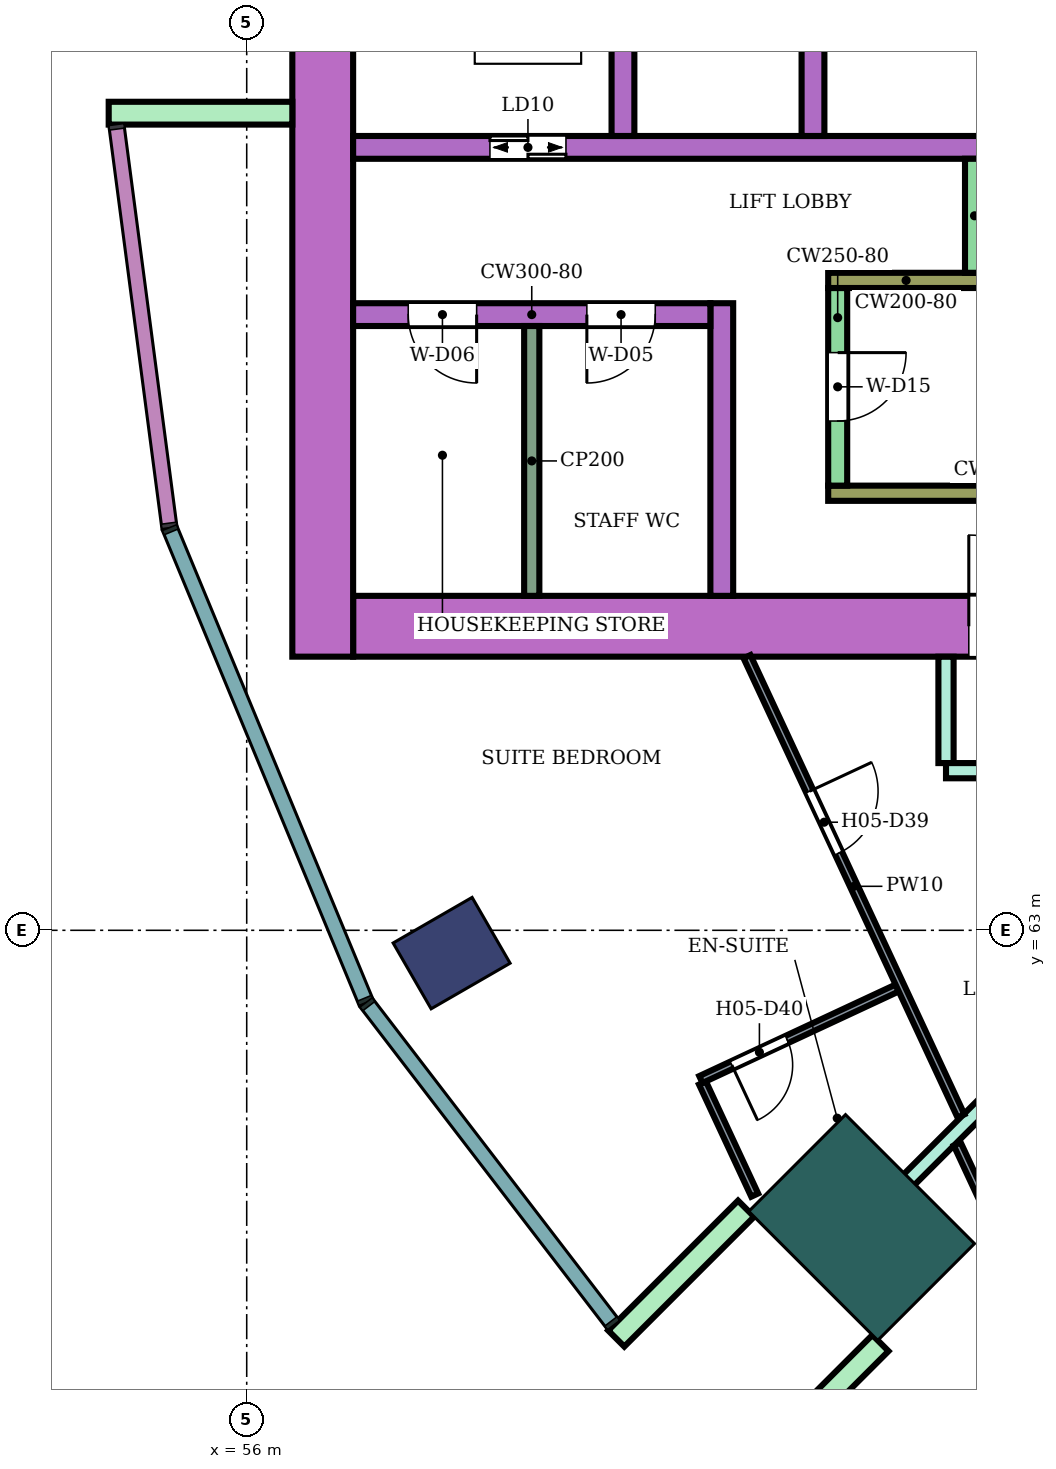
"""IFC4 building model, lengths in metres.
Left out: names, types, materials, properties, quantities, classifications, styles, units other than length and angle.
Written with IfcOpenShell. Run it as: python <this file> out.ifc"""

import sys

from ifc_helpers import new_model, si_unit, direction, frame, frame_2d, origin, origin_2d, place, context, subcontext, project, spatial, rectangle, extrude, element, fill, save


model = new_model("IFC4")
c1 = context("Model", 3, precision=1e-05, world=origin(), true_north=direction((0.0, 1.0)))
c2 = subcontext(c1, "Body", "Model", "MODEL_VIEW")
j1 = project(units=[si_unit("LENGTHUNIT", "METRE"), si_unit("PLANEANGLEUNIT", "RADIAN")], contexts=[c1])
p1 = place(None, origin())
s1 = spatial("IfcSite", under=j1, at=p1, CompositionType="ELEMENT")
p2 = place(p1, origin())
s2 = spatial("IfcBuilding", under=s1, at=p2, CompositionType="ELEMENT")
p3 = place(p2, frame((0.0, 0.0, 90.0)))
s3 = spatial("IfcBuildingStorey", under=s2, at=p3, CompositionType="ELEMENT", Elevation=90.0)
p4 = place(p3, frame((58.696, 62.7, 0.0), z_axis=(0.0, 0.0, 1.0), x_axis=(-0.866025403784, -0.5, 0.0)))
e1 = element("IfcColumn", 1, at=p4, inside=s3, PredefinedType="COLUMN", context=c2, shape_type="SweptSolid", body=[
    extrude(rectangle(XDim=1.2, YDim=1.0, at=origin_2d()), origin(), (0.0, 0.0, 1.0), 3.8),
])
p5 = place(p3, frame((64.09, 59.09, 0.0), z_axis=(0.0, 0.0, 1.0), x_axis=(-0.707106781187, -0.707106781187, 0.0)))
e2 = element("IfcColumn", 2, at=p5, inside=s3, PredefinedType="COLUMN", context=c2, shape_type="SweptSolid", body=[
    extrude(rectangle(XDim=1.8, YDim=2.4, at=origin_2d()), origin(), (0.0, 0.0, 1.0), 3.8),
])
p6 = place(p3, frame((72.1, 67.0, 0.0), z_axis=(0.0, 0.0, 1.0), x_axis=(-1.0, 0.0, 0.0)))
e3 = element("IfcWall", 3, at=p6, inside=s3, PredefinedType="SHEAR", context=c2, shape_type="SweptSolid", body=[
    extrude(rectangle(XDim=14.7, YDim=0.8, at=frame_2d((7.35, 0.0))), origin(), (0.0, 0.0, 1.0), 3.48),
])
p7 = place(p6, frame((4.2, 0.0, 0.0)))
e4 = element("IfcOpeningElement", 4, at=p7, cuts=e3, PredefinedType="OPENING", context=c2, shape_type="SweptSolid", body=[
    extrude(rectangle(XDim=2.4, YDim=2.4, at=frame_2d((1.2, 1.2))), frame((0.0, 0.41, 0.0), z_axis=(0.0, -1.0, 0.0), x_axis=(1.0, 0.0, 0.0)), (0.0, 0.0, 1.0), 0.82),
])
p8 = place(p3, frame((57.0, 83.4, 0.0), z_axis=(0.0, 0.0, 1.0), x_axis=(0.0, -1.0, 0.0)))
e5 = element("IfcWall", 5, at=p8, inside=s3, PredefinedType="SHEAR", context=c2, shape_type="SweptSolid", body=[
    extrude(rectangle(XDim=16.8, YDim=0.8, at=frame_2d((8.4, 0.0))), origin(), (0.0, 0.0, 1.0), 3.48),
])
p9 = place(p3, frame((68.3, 73.3, 0.0), z_axis=(0.0, 0.0, 1.0), x_axis=(-1.0, 0.0, 0.0)))
e6 = element("IfcWall", 6, at=p9, inside=s3, PredefinedType="SHEAR", context=c2, shape_type="SweptSolid", body=[
    extrude(rectangle(XDim=10.9, YDim=0.3, at=frame_2d((5.45, 0.0))), origin(), (0.0, 0.0, 1.0), 3.48),
])
p10 = place(p9, frame((0.55, 0.0, 0.0)))
e7 = element("IfcOpeningElement", 7, at=p10, cuts=e6, PredefinedType="OPENING", context=c2, shape_type="SweptSolid", body=[
    extrude(rectangle(XDim=1.1, YDim=2.1, at=frame_2d((0.55, 1.05))), frame((0.0, 0.16, 0.0), z_axis=(0.0, -1.0, 0.0), x_axis=(1.0, 0.0, 0.0)), (0.0, 0.0, 1.0), 0.32),
])
p11 = place(p9, frame((8.1, 0.0, 0.0)))
e8 = element("IfcOpeningElement", 8, at=p11, cuts=e6, PredefinedType="OPENING", context=c2, shape_type="SweptSolid", body=[
    extrude(rectangle(XDim=1.0, YDim=2.1, at=frame_2d((0.5, 1.05))), frame((0.0, 0.16, 0.0), z_axis=(0.0, -1.0, 0.0), x_axis=(1.0, 0.0, 0.0)), (0.0, 0.0, 1.0), 0.32),
])
for number, where, z_axis, x_axis in (
    (9, (63.45, 76.0, 0.0), (0.0, 0.0, 1.0), (0.0, -1.0, 0.0)),
    (10, (60.95, 76.0, 0.0), (0.0, 0.0, 1.0), (0.0, -1.0, 0.0)),
):
    element("IfcWall", number, at=place(p3, frame(where, z_axis=z_axis, x_axis=x_axis)), inside=s3, PredefinedType="SHEAR", context=c2, shape_type="SweptSolid", body=[
        extrude(rectangle(XDim=2.55, YDim=0.3, at=frame_2d((1.275, 0.0))), origin(), (0.0, 0.0, 1.0), 3.48),
    ])
p12 = place(p3, frame((68.3, 68.75, 0.0), z_axis=(0.0, 0.0, 1.0), x_axis=(-1.0, 0.0, 0.0)))
e11 = element("IfcWall", 11, at=p12, inside=s3, PredefinedType="SHEAR", context=c2, shape_type="SweptSolid", body=[
    extrude(rectangle(XDim=4.65, YDim=0.2, at=frame_2d((2.325, 0.0))), origin(), (0.0, 0.0, 1.0), 3.48),
])
p13 = place(p3, frame((63.775, 71.45, 0.0), z_axis=(0.0, 0.0, 1.0), x_axis=(0.0, -1.0, 0.0)))
e12 = element("IfcWall", 12, at=p13, inside=s3, PredefinedType="SHEAR", context=c2, shape_type="SweptSolid", body=[
    extrude(rectangle(XDim=2.6, YDim=0.25, at=frame_2d((1.3, 0.0))), origin(), (0.0, 0.0, 1.0), 3.48),
])
p14 = place(p13, frame((0.85, 0.0, 0.0)))
e13 = element("IfcOpeningElement", 13, at=p14, cuts=e12, PredefinedType="OPENING", context=c2, shape_type="SweptSolid", body=[
    extrude(rectangle(XDim=0.9, YDim=2.1, at=frame_2d((0.45, 1.05))), frame((0.0, 0.135, 0.0), z_axis=(0.0, -1.0, 0.0), x_axis=(1.0, 0.0, 0.0)), (0.0, 0.0, 1.0), 0.27),
])
p15 = place(p3, frame((65.7, 71.55, 0.0), z_axis=(0.0, 0.0, 1.0), x_axis=(-1.0, 0.0, 0.0)))
e14 = element("IfcWall", 14, at=p15, inside=s3, PredefinedType="SHEAR", context=c2, shape_type="SweptSolid", body=[
    extrude(rectangle(XDim=2.05, YDim=0.2, at=frame_2d((1.025, 0.0))), origin(), (0.0, 0.0, 1.0), 3.48),
])
p16 = place(p3, frame((65.575, 73.15, 0.0), z_axis=(0.0, 0.0, 1.0), x_axis=(0.0, -1.0, 0.0)))
e15 = element("IfcWall", 15, at=p16, inside=s3, PredefinedType="SHEAR", context=c2, shape_type="SweptSolid", body=[
    extrude(rectangle(XDim=1.5, YDim=0.25, at=frame_2d((0.75, 0.0))), origin(), (0.0, 0.0, 1.0), 3.48),
])
p17 = place(p3, frame((62.25, 71.25, 0.0), z_axis=(0.0, 0.0, 1.0), x_axis=(0.0, -1.0, 0.0)))
e16 = element("IfcWall", 16, at=p17, inside=s3, PredefinedType="SHEAR", context=c2, shape_type="SweptSolid", body=[
    extrude(rectangle(XDim=3.85, YDim=0.3, at=frame_2d((1.925, 0.0))), origin(), (0.0, 0.0, 1.0), 3.48),
])
p18 = place(p3, frame((62.1, 71.1, 0.0), z_axis=(0.0, 0.0, 1.0), x_axis=(-1.0, 0.0, 0.0)))
e17 = element("IfcWall", 17, at=p18, inside=s3, PredefinedType="SHEAR", context=c2, shape_type="SweptSolid", body=[
    extrude(rectangle(XDim=4.7, YDim=0.3, at=frame_2d((2.35, 0.0))), origin(), (0.0, 0.0, 1.0), 3.48),
])
p19 = place(p18, frame((0.725, 0.0, 0.0)))
e18 = element("IfcOpeningElement", 18, at=p19, cuts=e17, PredefinedType="OPENING", context=c2, shape_type="SweptSolid", body=[
    extrude(rectangle(XDim=0.9, YDim=2.1, at=frame_2d((0.45, 1.05))), frame((0.0, 0.16, 0.0), z_axis=(0.0, -1.0, 0.0), x_axis=(1.0, 0.0, 0.0)), (0.0, 0.0, 1.0), 0.32),
])
p20 = place(p18, frame((3.075, 0.0, 0.0)))
e19 = element("IfcOpeningElement", 19, at=p20, cuts=e17, PredefinedType="OPENING", context=c2, shape_type="SweptSolid", body=[
    extrude(rectangle(XDim=0.9, YDim=2.1, at=frame_2d((0.45, 1.05))), frame((0.0, 0.16, 0.0), z_axis=(0.0, -1.0, 0.0), x_axis=(1.0, 0.0, 0.0)), (0.0, 0.0, 1.0), 0.32),
])
for number, where, z_axis, x_axis in (
    (20, (56.6, 73.75, 0.0), (0.0, 0.0, 1.0), (-1.0, 0.0, 0.0)),
    (21, (62.57, 59.338, 0.0), (0.0, 0.0, 1.0), (-0.707, -0.707, 0.0)),
    (22, (64.338, 57.57, 0.0), (0.0, 0.0, 1.0), (-0.707, -0.707, 0.0)),
):
    element("IfcWall", number, at=place(p3, frame(where, z_axis=z_axis, x_axis=x_axis)), inside=s3, PredefinedType="NOTDEFINED", context=c2, shape_type="SweptSolid", body=[
        extrude(rectangle(XDim=2.416, YDim=0.3, at=frame_2d((1.208, 0.0))), origin(), (0.0, 0.0, 1.0), 3.8),
    ])
p21 = place(p3, frame((63.593, 58.599, 0.0), z_axis=(0.0, 0.0, 1.0), x_axis=(0.707292874152, 0.706920639233, 0.0)))
e23 = element("IfcWall", 23, at=p21, inside=s3, PredefinedType="PARTITIONING", context=c2, shape_type="SweptSolid", body=[
    extrude(rectangle(XDim=5.247, YDim=0.2, at=frame_2d((2.624, 0.0))), origin(), (0.0, 0.0, 1.0), 3.35),
])
p22 = place(p3, frame((65.2, 65.2, 0.0), z_axis=(0.0, 0.0, 1.0), x_axis=(0.0, 1.0, 0.0)))
e24 = element("IfcWall", 24, at=p22, inside=s3, PredefinedType="PARTITIONING", context=c2, shape_type="SweptSolid", body=[
    extrude(rectangle(XDim=1.399, YDim=0.2, at=frame_2d((0.7, 0.0))), origin(), (0.0, 0.0, 1.0), 3.35),
])
p23 = place(p3, frame((65.2, 65.1, 0.0), z_axis=(0.0, 0.0, 1.0), x_axis=(1.0, 0.0, 0.0)))
e25 = element("IfcWall", 25, at=p23, inside=s3, PredefinedType="PARTITIONING", context=c2, shape_type="SweptSolid", body=[
    extrude(rectangle(XDim=0.859, YDim=0.2, at=frame_2d((0.43, 0.0))), origin(), (0.0, 0.0, 1.0), 3.35),
])
p24 = place(p3, frame((61.996, 60.992, 0.0), z_axis=(0.0, 0.0, 1.0), x_axis=(0.422318684634, -0.906447421867, 0.0)))
e26 = element("IfcWall", 26, at=p24, inside=s3, PredefinedType="PARTITIONING", context=c2, shape_type="SweptSolid", body=[
    extrude(rectangle(XDim=1.627, YDim=0.1, at=frame_2d((0.814, 0.0))), origin(), (0.0, 0.0, 1.0), 3.35),
])
p25 = place(p3, frame((61.975, 61.037, 0.0), z_axis=(0.0, 0.0, 1.0), x_axis=(0.906360368959, 0.422505481125, 0.0)))
e27 = element("IfcWall", 27, at=p25, inside=s3, PredefinedType="PARTITIONING", context=c2, shape_type="SweptSolid", body=[
    extrude(rectangle(XDim=2.849, YDim=0.1, at=frame_2d((1.425, 0.0))), origin(), (0.0, 0.0, 1.0), 3.35),
])
p26 = place(p25, frame((0.45, 0.0, 0.0)))
e28 = element("IfcOpeningElement", 28, at=p26, cuts=e27, PredefinedType="OPENING", context=c2, shape_type="SweptSolid", body=[
    extrude(rectangle(XDim=0.8, YDim=2.1, at=frame_2d((0.4, 1.05))), frame((0.0, 0.06, 0.0), z_axis=(0.0, -1.0, 0.0), x_axis=(1.0, 0.0, 0.0)), (0.0, 0.0, 1.0), 0.12),
])
p27 = place(p3, frame((62.582, 66.6, 0.0), z_axis=(0.0, 0.0, 1.0), x_axis=(0.422283870085, -0.906463641337, 0.0)))
e29 = element("IfcWall", 29, at=p27, inside=s3, PredefinedType="PARTITIONING", context=c2, shape_type="SweptSolid", body=[
    extrude(rectangle(XDim=6.666, YDim=0.1, at=frame_2d((3.333, 0.0))), origin(), (0.0, 0.0, 1.0), 3.35),
])
p28 = place(p27, frame((1.953, 0.0, 0.0)))
e30 = element("IfcOpeningElement", 30, at=p28, cuts=e29, PredefinedType="OPENING", context=c2, shape_type="SweptSolid", body=[
    extrude(rectangle(XDim=0.9, YDim=2.1, at=frame_2d((0.45, 1.05))), frame((0.0, 0.06, 0.0), z_axis=(0.0, -1.0, 0.0), x_axis=(1.0, 0.0, 0.0)), (0.0, 0.0, 1.0), 0.12),
])
p29 = place(p3, frame((65.348, 60.188, 0.0), z_axis=(0.0, 0.0, 1.0), x_axis=(0.422387529151, -0.906415343657, 0.0)))
e31 = element("IfcWall", 31, at=p29, inside=s3, PredefinedType="PARTITIONING", context=c2, shape_type="SweptSolid", body=[
    extrude(rectangle(XDim=1.208, YDim=0.1, at=frame_2d((0.604, 0.0))), origin(), (0.0, 0.0, 1.0), 3.35),
])
p30 = place(p3, frame((59.75, 70.95, 0.0), z_axis=(0.0, 0.0, 1.0), x_axis=(0.0, -1.0, 0.0)))
e32 = element("IfcWall", 32, at=p30, inside=s3, PredefinedType="PARTITIONING", context=c2, shape_type="SweptSolid", body=[
    extrude(rectangle(XDim=3.55, YDim=0.2, at=frame_2d((1.775, 0.0))), origin(), (0.0, 0.0, 1.0), 3.48),
])
p31 = place(p28, origin())
e33 = element("IfcDoor", 33, at=p31, inside=s3, OperationType="SINGLE_SWING_LEFT", PredefinedType="DOOR", context=c2, shape_type="SweptSolid", body=[
    extrude(rectangle(XDim=0.9, YDim=2.1, at=frame_2d((0.45, 1.05))), frame((0.0, 0.025, 0.0), z_axis=(0.0, -1.0, 0.0), x_axis=(1.0, 0.0, 0.0)), (0.0, 0.0, 1.0), 0.05),
])
fill(e30, e33)
p32 = place(p26, frame((0.8, 0.0, 0.0), z_axis=(0.0, 0.0, 1.0), x_axis=(-1.0, 0.0, 0.0)))
e34 = element("IfcDoor", 34, at=p32, inside=s3, OperationType="SINGLE_SWING_RIGHT", PredefinedType="DOOR", context=c2, shape_type="SweptSolid", body=[
    extrude(rectangle(XDim=0.8, YDim=2.1, at=frame_2d((0.4, 1.05))), frame((0.0, 0.025, 0.0), z_axis=(0.0, -1.0, 0.0), x_axis=(1.0, 0.0, 0.0)), (0.0, 0.0, 1.0), 0.05),
])
fill(e28, e34)
p33 = place(p11, origin())
e35 = element("IfcDoor", 35, at=p33, inside=s3, OperationType="DOUBLE_DOOR_SLIDING", PredefinedType="DOOR", context=c2, shape_type="SweptSolid", body=[
    extrude(rectangle(XDim=1.0, YDim=2.1, at=frame_2d((0.5, 1.05))), frame((0.0, 0.025, 0.0), z_axis=(0.0, -1.0, 0.0), x_axis=(1.0, 0.0, 0.0)), (0.0, 0.0, 1.0), 0.05),
])
fill(e8, e35)
p34 = place(p14, origin())
e36 = element("IfcDoor", 36, at=p34, inside=s3, OperationType="SINGLE_SWING_LEFT", PredefinedType="DOOR", context=c2, shape_type="SweptSolid", body=[
    extrude(rectangle(XDim=0.9, YDim=2.1, at=frame_2d((0.45, 1.05))), frame((0.0, 0.025, 0.0), z_axis=(0.0, -1.0, 0.0), x_axis=(1.0, 0.0, 0.0)), (0.0, 0.0, 1.0), 0.05),
])
fill(e13, e36)
p35 = place(p19, origin())
e37 = element("IfcDoor", 37, at=p35, inside=s3, OperationType="SINGLE_SWING_RIGHT", PredefinedType="DOOR", context=c2, shape_type="SweptSolid", body=[
    extrude(rectangle(XDim=0.9, YDim=2.1, at=frame_2d((0.45, 1.05))), frame((0.0, 0.025, 0.0), z_axis=(0.0, -1.0, 0.0), x_axis=(1.0, 0.0, 0.0)), (0.0, 0.0, 1.0), 0.05),
])
fill(e18, e37)
p36 = place(p20, origin())
e38 = element("IfcDoor", 38, at=p36, inside=s3, OperationType="SINGLE_SWING_LEFT", PredefinedType="DOOR", context=c2, shape_type="SweptSolid", body=[
    extrude(rectangle(XDim=0.9, YDim=2.1, at=frame_2d((0.45, 1.05))), frame((0.0, 0.025, 0.0), z_axis=(0.0, -1.0, 0.0), x_axis=(1.0, 0.0, 0.0)), (0.0, 0.0, 1.0), 0.05),
])
fill(e19, e38)
p37 = place(p7, frame((2.4, 0.0, 0.0), z_axis=(0.0, 0.0, 1.0), x_axis=(-1.0, 0.0, 0.0)))
e39 = element("IfcDoor", 39, at=p37, inside=s3, OperationType="DOUBLE_DOOR_SINGLE_SWING", PredefinedType="DOOR", context=c2, shape_type="SweptSolid", body=[
    extrude(rectangle(XDim=2.4, YDim=2.4, at=frame_2d((1.2, 1.2))), frame((0.0, 0.025, 0.0), z_axis=(0.0, -1.0, 0.0), x_axis=(1.0, 0.0, 0.0)), (0.0, 0.0, 1.0), 0.05),
])
fill(e4, e39)
save(model, sys.argv[1])
